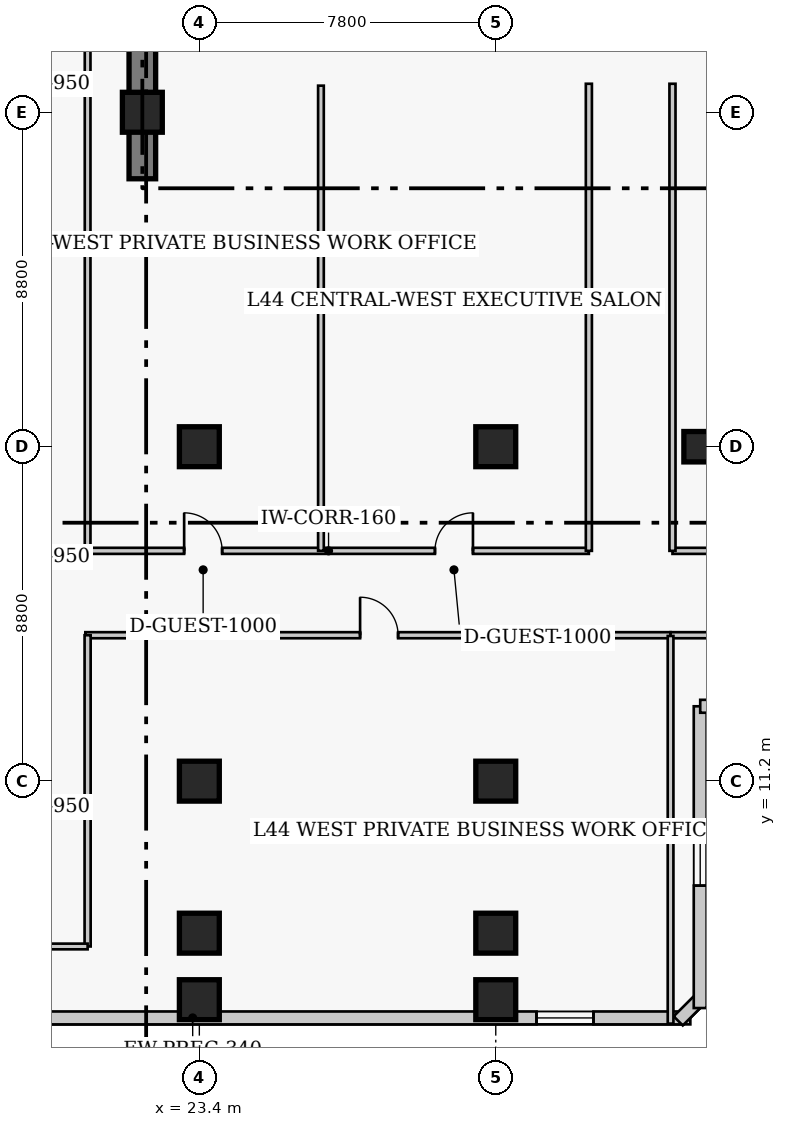
"""IFC4 building model, lengths in metres.
Left out: names, types, materials, properties, quantities, classifications, styles, units other than length and angle.
Written with IfcOpenShell. Run it as: python <this file> out.ifc"""

import sys

from ifc_helpers import new_model, si_unit, direction, frame, frame_2d, origin, origin_2d, place, context, subcontext, project, spatial, rectangle, extrude, element, fill, save


model = new_model("IFC4")
c1 = context("Model", 3, precision=1e-05, world=origin(), true_north=direction((0.0, 1.0)))
c2 = subcontext(c1, "Body", "Model", "MODEL_VIEW")
j1 = project(units=[si_unit("LENGTHUNIT", "METRE"), si_unit("PLANEANGLEUNIT", "RADIAN")], contexts=[c1])
p1 = place(None, origin())
s1 = spatial("IfcSite", under=j1, at=p1, CompositionType="ELEMENT")
p2 = place(p1, origin())
s2 = spatial("IfcBuilding", under=s1, at=p2, CompositionType="ELEMENT")
p3 = place(p2, frame((0.0, 0.0, 176.4)))
s3 = spatial("IfcBuildingStorey", under=s2, at=p3, CompositionType="ELEMENT", Elevation=176.4)
p4 = place(p3, frame((21.9, 27.05, 0.0), z_axis=(0.0, 0.0, 1.0), x_axis=(0.0, 1.0, 0.0)))
e1 = element("IfcWall", 1, at=p4, inside=s3, PredefinedType="SHEAR", context=c2, shape_type="SweptSolid", body=[
    extrude(rectangle(XDim=13.62, YDim=0.7, at=frame_2d((6.81, 0.0))), origin(), (0.0, 0.0, 1.0), 3.8),
])
for number, where, z_axis, x_axis in (
    (2, (23.4, 11.2, 0.0), (0.0, 0.0, 1.0), (1.0, 0.0, 0.0)),
    (3, (23.4, 20.0, 0.0), (0.0, 0.0, 1.0), (1.0, 0.0, 0.0)),
    (4, (31.2, 11.2, 0.0), (0.0, 0.0, 1.0), (1.0, 0.0, 0.0)),
    (5, (31.2, 20.0, 0.0), (0.0, 0.0, 1.0), (1.0, 0.0, 0.0)),
):
    element("IfcColumn", number, at=place(p3, frame(where, z_axis=z_axis, x_axis=x_axis)), inside=s3, PredefinedType="COLUMN", context=c2, shape_type="SweptSolid", body=[
        extrude(rectangle(XDim=1.05, YDim=1.05, at=origin_2d()), origin(), (0.0, 0.0, 1.0), 3.8),
    ])
p5 = place(p3, frame((36.75, 20.0, 0.0), z_axis=(0.0, 0.0, 1.0), x_axis=(1.0, 0.0, 0.0)))
e6 = element("IfcColumn", 6, at=p5, inside=s3, PredefinedType="COLUMN", context=c2, shape_type="SweptSolid", body=[
    extrude(rectangle(XDim=1.2, YDim=0.8, at=origin_2d()), origin(), (0.0, 0.0, 1.0), 3.8),
])
for number, where, z_axis, x_axis in (
    (7, (21.9, 28.8, 0.0), (0.0, 0.0, 1.0), (1.0, 0.0, 0.0)),
    (8, (23.4, 7.2, 0.0), (0.0, 0.0, 1.0), (1.0, 0.0, 0.0)),
    (9, (31.2, 7.2, 0.0), (0.0, 0.0, 1.0), (1.0, 0.0, 0.0)),
    (10, (23.4, 5.45, 0.0), (0.0, 0.0, 1.0), (1.0, 0.0, 0.0)),
    (11, (31.2, 5.45, 0.0), (0.0, 0.0, 1.0), (1.0, 0.0, 0.0)),
):
    element("IfcColumn", number, at=place(p3, frame(where, z_axis=z_axis, x_axis=x_axis)), inside=s3, PredefinedType="COLUMN", context=c2, shape_type="SweptSolid", body=[
        extrude(rectangle(XDim=1.05, YDim=1.05, at=origin_2d()), origin(), (0.0, 0.0, 1.0), 3.8),
    ])
p6 = place(p3, frame((9.63, 4.97, 0.0), z_axis=(0.0, 0.0, 1.0), x_axis=(1.0, 0.0, 0.0)))
e12 = element("IfcWall", 12, at=p6, inside=s3, PredefinedType="SOLIDWALL", context=c2, shape_type="SweptSolid", body=[
    extrude(rectangle(XDim=26.69, YDim=0.34, at=frame_2d((13.345, 0.0))), origin(), (0.0, 0.0, 1.0), 3.55),
])
p7 = place(p6, frame((3.048, 0.0, 0.85)))
e13 = element("IfcOpeningElement", 13, at=p7, cuts=e12, PredefinedType="OPENING", context=c2, shape_type="SweptSolid", body=[
    extrude(rectangle(XDim=1.5, YDim=1.75, at=frame_2d((0.75, 0.875))), frame((0.0, 0.18, 0.0), z_axis=(0.0, -1.0, 0.0), x_axis=(1.0, 0.0, 0.0)), (0.0, 0.0, 1.0), 0.36),
])
p8 = place(p6, frame((22.642, 0.0, 0.85)))
e14 = element("IfcOpeningElement", 14, at=p8, cuts=e12, PredefinedType="OPENING", context=c2, shape_type="SweptSolid", body=[
    extrude(rectangle(XDim=1.5, YDim=1.75, at=frame_2d((0.75, 0.875))), frame((0.0, 0.18, 0.0), z_axis=(0.0, -1.0, 0.0), x_axis=(1.0, 0.0, 0.0)), (0.0, 0.0, 1.0), 0.36),
])
p9 = place(p3, frame((36.001, 4.892, 0.0), z_axis=(0.0, 0.0, 1.0), x_axis=(0.707106781187, 0.707106781187, 0.0)))
e15 = element("IfcWall", 15, at=p9, inside=s3, PredefinedType="SOLIDWALL", context=c2, shape_type="SweptSolid", body=[
    extrude(rectangle(XDim=0.929, YDim=0.34, at=frame_2d((0.464, 0.0))), origin(), (0.0, 0.0, 1.0), 3.55),
])
p10 = place(p3, frame((36.58, 5.23, 0.0), z_axis=(0.0, 0.0, 1.0), x_axis=(0.0, 1.0, 0.0)))
e16 = element("IfcWall", 16, at=p10, inside=s3, PredefinedType="SOLIDWALL", context=c2, shape_type="SweptSolid", body=[
    extrude(rectangle(XDim=7.94, YDim=0.34, at=frame_2d((3.97, 0.0))), origin(), (0.0, 0.0, 1.0), 3.55),
])
p11 = place(p10, frame((3.22, 0.0, 0.85)))
e17 = element("IfcOpeningElement", 17, at=p11, cuts=e16, PredefinedType="OPENING", context=c2, shape_type="SweptSolid", body=[
    extrude(rectangle(XDim=1.5, YDim=1.75, at=frame_2d((0.75, 0.875))), frame((0.0, 0.18, 0.0), z_axis=(0.0, -1.0, 0.0), x_axis=(1.0, 0.0, 0.0)), (0.0, 0.0, 1.0), 0.36),
])
p12 = place(p3, frame((36.58, 13.17, 0.0), z_axis=(0.0, 0.0, 1.0), x_axis=(1.0, 0.0, 0.0)))
e18 = element("IfcWall", 18, at=p12, inside=s3, PredefinedType="SOLIDWALL", context=c2, shape_type="SweptSolid", body=[
    extrude(rectangle(XDim=4.84, YDim=0.34, at=frame_2d((2.42, 0.0))), origin(), (0.0, 0.0, 1.0), 3.55),
])
p13 = place(p12, frame((1.67, 0.0, 0.85)))
e19 = element("IfcOpeningElement", 19, at=p13, cuts=e18, PredefinedType="OPENING", context=c2, shape_type="SweptSolid", body=[
    extrude(rectangle(XDim=1.5, YDim=1.75, at=frame_2d((0.75, 0.875))), frame((0.0, 0.18, 0.0), z_axis=(0.0, -1.0, 0.0), x_axis=(1.0, 0.0, 0.0)), (0.0, 0.0, 1.0), 0.36),
])
p14 = place(p3, frame((20.4, 17.26, 0.0), z_axis=(0.0, 0.0, 1.0), x_axis=(1.0, 0.0, 0.0)))
e20 = element("IfcWall", 20, at=p14, inside=s3, PredefinedType="PARTITIONING", context=c2, shape_type="SweptSolid", body=[
    extrude(rectangle(XDim=13.25, YDim=0.16, at=frame_2d((6.625, 0.0))), origin(), (0.0, 0.0, 1.0), 3.55),
])
p15 = place(p14, frame((2.6, 0.0, 0.0)))
e21 = element("IfcOpeningElement", 21, at=p15, cuts=e20, PredefinedType="OPENING", context=c2, shape_type="SweptSolid", body=[
    extrude(rectangle(XDim=1.0, YDim=2.15, at=frame_2d((0.5, 1.075))), frame((0.0, 0.09, 0.0), z_axis=(0.0, -1.0, 0.0), x_axis=(1.0, 0.0, 0.0)), (0.0, 0.0, 1.0), 0.18),
])
p16 = place(p14, frame((9.2, 0.0, 0.0)))
e22 = element("IfcOpeningElement", 22, at=p16, cuts=e20, PredefinedType="OPENING", context=c2, shape_type="SweptSolid", body=[
    extrude(rectangle(XDim=1.0, YDim=2.15, at=frame_2d((0.5, 1.075))), frame((0.0, 0.09, 0.0), z_axis=(0.0, -1.0, 0.0), x_axis=(1.0, 0.0, 0.0)), (0.0, 0.0, 1.0), 0.18),
])
p17 = place(p3, frame((35.85, 17.26, 0.0), z_axis=(0.0, 0.0, 1.0), x_axis=(1.0, 0.0, 0.0)))
e23 = element("IfcWall", 23, at=p17, inside=s3, PredefinedType="PARTITIONING", context=c2, shape_type="SweptSolid", body=[
    extrude(rectangle(XDim=23.35, YDim=0.16, at=frame_2d((11.675, 0.0))), origin(), (0.0, 0.0, 1.0), 3.55),
])
p18 = place(p17, frame((8.95, 0.0, 0.0)))
e24 = element("IfcOpeningElement", 24, at=p18, cuts=e23, PredefinedType="OPENING", context=c2, shape_type="SweptSolid", body=[
    extrude(rectangle(XDim=1.0, YDim=2.15, at=frame_2d((0.5, 1.075))), frame((0.0, 0.09, 0.0), z_axis=(0.0, -1.0, 0.0), x_axis=(1.0, 0.0, 0.0)), (0.0, 0.0, 1.0), 0.18),
])
p19 = place(p17, frame((17.625, 0.0, 0.0)))
e25 = element("IfcOpeningElement", 25, at=p19, cuts=e23, PredefinedType="OPENING", context=c2, shape_type="SweptSolid", body=[
    extrude(rectangle(XDim=1.0, YDim=2.15, at=frame_2d((0.5, 1.075))), frame((0.0, 0.09, 0.0), z_axis=(0.0, -1.0, 0.0), x_axis=(1.0, 0.0, 0.0)), (0.0, 0.0, 1.0), 0.18),
])
for number, where, z_axis, x_axis in (
    (26, (33.65, 17.26, 0.0), (0.0, 0.0, 1.0), (0.0, 1.0, 0.0)),
    (27, (35.85, 17.26, 0.0), (0.0, 0.0, 1.0), (0.0, 1.0, 0.0)),
):
    element("IfcWall", number, at=place(p3, frame(where, z_axis=z_axis, x_axis=x_axis)), inside=s3, PredefinedType="PARTITIONING", context=c2, shape_type="SweptSolid", body=[
        extrude(rectangle(XDim=12.29, YDim=0.16, at=frame_2d((6.145, 0.0))), origin(), (0.0, 0.0, 1.0), 3.55),
    ])
p20 = place(p3, frame((20.4, 15.04, 0.0), z_axis=(0.0, 0.0, 1.0), x_axis=(1.0, 0.0, 0.0)))
e28 = element("IfcWall", 28, at=p20, inside=s3, PredefinedType="PARTITIONING", context=c2, shape_type="SweptSolid", body=[
    extrude(rectangle(XDim=15.4, YDim=0.16, at=frame_2d((7.7, 0.0))), origin(), (0.0, 0.0, 1.0), 3.55),
])
p21 = place(p20, frame((7.23, 0.0, 0.0)))
e29 = element("IfcOpeningElement", 29, at=p21, cuts=e28, PredefinedType="OPENING", context=c2, shape_type="SweptSolid", body=[
    extrude(rectangle(XDim=1.0, YDim=2.15, at=frame_2d((0.5, 1.075))), frame((0.0, 0.09, 0.0), z_axis=(0.0, -1.0, 0.0), x_axis=(1.0, 0.0, 0.0)), (0.0, 0.0, 1.0), 0.18),
])
p22 = place(p3, frame((35.8, 15.04, 0.0), z_axis=(0.0, 0.0, 1.0), x_axis=(1.0, 0.0, 0.0)))
e30 = element("IfcWall", 30, at=p22, inside=s3, PredefinedType="PARTITIONING", context=c2, shape_type="SweptSolid", body=[
    extrude(rectangle(XDim=23.4, YDim=0.16, at=frame_2d((11.7, 0.0))), origin(), (0.0, 0.0, 1.0), 3.55),
])
p23 = place(p22, frame((11.25, 0.0, 0.0)))
e31 = element("IfcOpeningElement", 31, at=p23, cuts=e30, PredefinedType="OPENING", context=c2, shape_type="SweptSolid", body=[
    extrude(rectangle(XDim=0.95, YDim=2.1, at=frame_2d((0.475, 1.05))), frame((0.0, 0.09, 0.0), z_axis=(0.0, -1.0, 0.0), x_axis=(1.0, 0.0, 0.0)), (0.0, 0.0, 1.0), 0.18),
])
p24 = place(p22, frame((18.4, 0.0, 0.0)))
e32 = element("IfcOpeningElement", 32, at=p24, cuts=e30, PredefinedType="OPENING", context=c2, shape_type="SweptSolid", body=[
    extrude(rectangle(XDim=1.0, YDim=2.15, at=frame_2d((0.5, 1.075))), frame((0.0, 0.09, 0.0), z_axis=(0.0, -1.0, 0.0), x_axis=(1.0, 0.0, 0.0)), (0.0, 0.0, 1.0), 0.18),
])
p25 = place(p3, frame((20.46, 6.85, 0.0), z_axis=(0.0, 0.0, 1.0), x_axis=(0.0, 1.0, 0.0)))
e33 = element("IfcWall", 33, at=p25, inside=s3, PredefinedType="PARTITIONING", context=c2, shape_type="SweptSolid", body=[
    extrude(rectangle(XDim=8.19, YDim=0.16, at=frame_2d((4.095, 0.0))), origin(), (0.0, 0.0, 1.0), 3.55),
])
p26 = place(p3, frame((18.24, 6.85, 0.0), z_axis=(0.0, 0.0, 1.0), x_axis=(1.0, 0.0, 0.0)))
e34 = element("IfcWall", 34, at=p26, inside=s3, PredefinedType="PARTITIONING", context=c2, shape_type="SweptSolid", body=[
    extrude(rectangle(XDim=2.22, YDim=0.15, at=frame_2d((1.11, 0.0))), origin(), (0.0, 0.0, 1.0), 3.55),
])
p27 = place(p3, frame((20.46, 17.26, 0.0), z_axis=(0.0, 0.0, 1.0), x_axis=(0.0, 1.0, 0.0)))
e35 = element("IfcWall", 35, at=p27, inside=s3, PredefinedType="PARTITIONING", context=c2, shape_type="SweptSolid", body=[
    extrude(rectangle(XDim=15.54, YDim=0.15, at=frame_2d((7.77, 0.0))), origin(), (0.0, 0.0, 1.0), 3.55),
])
p28 = place(p3, frame((26.6, 17.26, 0.0), z_axis=(0.0, 0.0, 1.0), x_axis=(0.0, 1.0, 0.0)))
e36 = element("IfcWall", 36, at=p28, inside=s3, PredefinedType="PARTITIONING", context=c2, shape_type="SweptSolid", body=[
    extrude(rectangle(XDim=12.24, YDim=0.15, at=frame_2d((6.12, 0.0))), origin(), (0.0, 0.0, 1.0), 3.55),
])
p29 = place(p3, frame((35.8, 4.82, 0.0), z_axis=(0.0, 0.0, 1.0), x_axis=(0.0, 1.0, 0.0)))
e37 = element("IfcWall", 37, at=p29, inside=s3, PredefinedType="PARTITIONING", context=c2, shape_type="SweptSolid", body=[
    extrude(rectangle(XDim=10.2, YDim=0.15, at=frame_2d((5.1, 0.0))), origin(), (0.0, 0.0, 1.0), 3.55),
])
p30 = place(p8, origin())
e38 = element("IfcWindow", 38, at=p30, inside=s3, PartitioningType="SINGLE_PANEL", PredefinedType="WINDOW", context=c2, shape_type="SweptSolid", body=[
    extrude(rectangle(XDim=1.5, YDim=1.75, at=frame_2d((0.75, 0.875))), frame((0.0, 0.03, 0.0), z_axis=(0.0, -1.0, 0.0), x_axis=(1.0, 0.0, 0.0)), (0.0, 0.0, 1.0), 0.06),
])
fill(e14, e38)
p31 = place(p11, origin())
e39 = element("IfcWindow", 39, at=p31, inside=s3, PartitioningType="SINGLE_PANEL", PredefinedType="WINDOW", context=c2, shape_type="SweptSolid", body=[
    extrude(rectangle(XDim=1.5, YDim=1.75, at=frame_2d((0.75, 0.875))), frame((0.0, 0.03, 0.0), z_axis=(0.0, -1.0, 0.0), x_axis=(1.0, 0.0, 0.0)), (0.0, 0.0, 1.0), 0.06),
])
fill(e17, e39)
p32 = place(p15, origin())
e40 = element("IfcDoor", 40, at=p32, inside=s3, OperationType="SINGLE_SWING_LEFT", PredefinedType="DOOR", context=c2, shape_type="SweptSolid", body=[
    extrude(rectangle(XDim=1.0, YDim=2.15, at=frame_2d((0.5, 1.075))), frame((0.0, 0.025, 0.0), z_axis=(0.0, -1.0, 0.0), x_axis=(1.0, 0.0, 0.0)), (0.0, 0.0, 1.0), 0.05),
])
fill(e21, e40)
p33 = place(p16, origin())
e41 = element("IfcDoor", 41, at=p33, inside=s3, OperationType="SINGLE_SWING_RIGHT", PredefinedType="DOOR", context=c2, shape_type="SweptSolid", body=[
    extrude(rectangle(XDim=1.0, YDim=2.15, at=frame_2d((0.5, 1.075))), frame((0.0, 0.025, 0.0), z_axis=(0.0, -1.0, 0.0), x_axis=(1.0, 0.0, 0.0)), (0.0, 0.0, 1.0), 0.05),
])
fill(e22, e41)
p34 = place(p21, origin())
e42 = element("IfcDoor", 42, at=p34, inside=s3, OperationType="SINGLE_SWING_LEFT", PredefinedType="DOOR", context=c2, shape_type="SweptSolid", body=[
    extrude(rectangle(XDim=1.0, YDim=2.15, at=frame_2d((0.5, 1.075))), frame((0.0, 0.025, 0.0), z_axis=(0.0, -1.0, 0.0), x_axis=(1.0, 0.0, 0.0)), (0.0, 0.0, 1.0), 0.05),
])
fill(e29, e42)
save(model, sys.argv[1])
